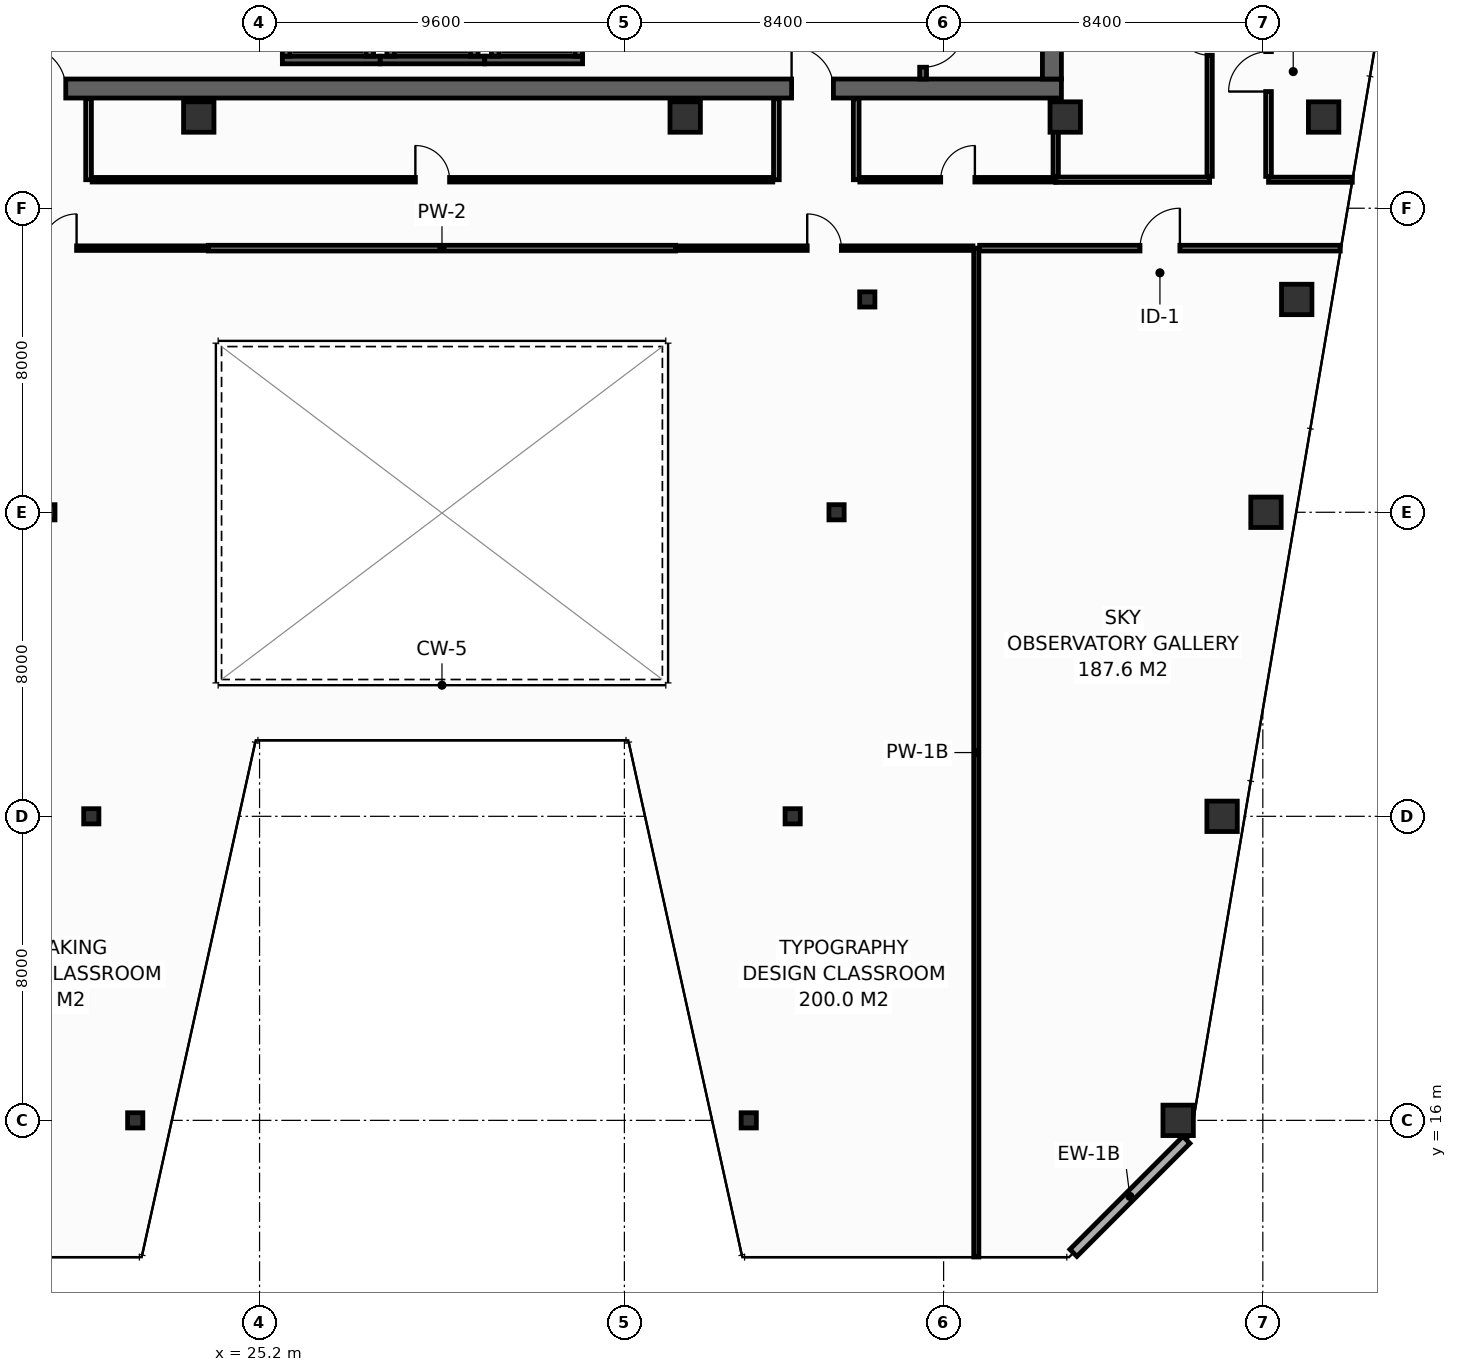
"""IFC4 building model, lengths in metres.
Left out: names, types, materials, properties, quantities, classifications, styles, units other than length and angle.
Written with IfcOpenShell. Run it as: python <this file> out.ifc"""

import sys

from ifc_helpers import new_model, si_unit, direction, frame, frame_2d, origin, origin_2d, place, context, subcontext, project, spatial, rectangle, hollow_rectangle, extrude, element, fill, save


model = new_model("IFC4")
c1 = context("Model", 3, precision=1e-05, world=origin(), true_north=direction((0.0, 1.0)))
c2 = subcontext(c1, "Body", "Model", "MODEL_VIEW")
j1 = project(units=[si_unit("LENGTHUNIT", "METRE"), si_unit("PLANEANGLEUNIT", "RADIAN")], contexts=[c1])
p1 = place(None, origin())
s1 = spatial("IfcSite", under=j1, at=p1, CompositionType="ELEMENT")
p2 = place(p1, origin())
s2 = spatial("IfcBuilding", under=s1, at=p2, CompositionType="ELEMENT")
p3 = place(p2, frame((0.0, 0.0, 220.8)))
s3 = spatial("IfcBuildingStorey", under=s2, at=p3, CompositionType="ELEMENT", Elevation=220.8)
p4 = place(p3, frame((13.6, 43.15, 0.0), z_axis=(0.0, 0.0, 1.0), x_axis=(1.0, 0.0, 0.0)))
e1 = element("IfcWall", 1, at=p4, inside=s3, PredefinedType="SHEAR", context=c2, shape_type="SweptSolid", body=[
    extrude(rectangle(XDim=32.7, YDim=0.5, at=frame_2d((16.35, 0.0))), origin(), (0.0, 0.0, 1.0), 3.35),
])
p5 = place(p4, frame((5.4, 0.0, 0.0)))
e2 = element("IfcOpeningElement", 2, at=p5, cuts=e1, PredefinedType="OPENING", context=c2, shape_type="SweptSolid", body=[
    extrude(rectangle(XDim=1.1, YDim=2.15, at=frame_2d((0.55, 1.075))), frame((0.0, 0.26, 0.0), z_axis=(0.0, -1.0, 0.0), x_axis=(1.0, 0.0, 0.0)), (0.0, 0.0, 1.0), 0.52),
])
p6 = place(p4, frame((25.6, 0.0, 0.0)))
e3 = element("IfcOpeningElement", 3, at=p6, cuts=e1, PredefinedType="OPENING", context=c2, shape_type="SweptSolid", body=[
    extrude(rectangle(XDim=1.1, YDim=2.15, at=frame_2d((0.55, 1.075))), frame((0.0, 0.26, 0.0), z_axis=(0.0, -1.0, 0.0), x_axis=(1.0, 0.0, 0.0)), (0.0, 0.0, 1.0), 0.52),
])
p7 = place(p3, frame((46.05, 43.4, 0.0), z_axis=(0.0, 0.0, 1.0), x_axis=(0.0, 1.0, 0.0)))
e4 = element("IfcWall", 4, at=p7, inside=s3, PredefinedType="SHEAR", context=c2, shape_type="SweptSolid", body=[
    extrude(rectangle(XDim=10.4, YDim=0.5, at=frame_2d((5.2, 0.0))), origin(), (0.0, 0.0, 1.0), 3.35),
])
for number, where, z_axis, x_axis in (
    (5, (23.6, 42.4, 0.0), (0.0, 0.0, 1.0), (1.0, 0.0, 0.0)),
    (6, (36.4, 42.4, 0.0), (0.0, 0.0, 1.0), (1.0, 0.0, 0.0)),
    (7, (46.4, 42.4, 0.0), (0.0, 0.0, 1.0), (1.0, 0.0, 0.0)),
    (8, (53.2, 42.4, 0.0), (0.0, 0.0, 1.0), (1.0, 0.0, 0.0)),
    (9, (49.372, 16.0, 0.0), (0.0, 0.0, 1.0), (1.0, 0.0, 0.0)),
):
    element("IfcColumn", number, at=place(p3, frame(where, z_axis=z_axis, x_axis=x_axis)), inside=s3, PredefinedType="COLUMN", context=c2, shape_type="SweptSolid", body=[
        extrude(hollow_rectangle(XDim=0.8, YDim=0.8, WallThickness=0.036, at=origin_2d()), origin(), (0.0, 0.0, 1.0), 3.8),
    ])
for number, where, z_axis, x_axis in (
    (10, (21.928, 16.0, 0.0), (0.0, 0.0, 1.0), (1.0, 0.0, 0.0)),
    (11, (38.072, 16.0, 0.0), (0.0, 0.0, 1.0), (1.0, 0.0, 0.0)),
):
    element("IfcColumn", number, at=place(p3, frame(where, z_axis=z_axis, x_axis=x_axis)), inside=s3, PredefinedType="COLUMN", context=c2, shape_type="SweptSolid", body=[
        extrude(hollow_rectangle(XDim=0.4, YDim=0.4, WallThickness=0.016, at=origin_2d()), origin(), (0.0, 0.0, 1.0), 3.8),
    ])
p8 = place(p3, frame((50.528, 24.0, 0.0), z_axis=(0.0, 0.0, 1.0), x_axis=(1.0, 0.0, 0.0)))
e12 = element("IfcColumn", 12, at=p8, inside=s3, PredefinedType="COLUMN", context=c2, shape_type="SweptSolid", body=[
    extrude(hollow_rectangle(XDim=0.8, YDim=0.8, WallThickness=0.036, at=origin_2d()), origin(), (0.0, 0.0, 1.0), 3.8),
])
for number, where, z_axis, x_axis in (
    (13, (20.772, 24.0, 0.0), (0.0, 0.0, 1.0), (1.0, 0.0, 0.0)),
    (14, (39.228, 24.0, 0.0), (0.0, 0.0, 1.0), (1.0, 0.0, 0.0)),
):
    element("IfcColumn", number, at=place(p3, frame(where, z_axis=z_axis, x_axis=x_axis)), inside=s3, PredefinedType="COLUMN", context=c2, shape_type="SweptSolid", body=[
        extrude(hollow_rectangle(XDim=0.4, YDim=0.4, WallThickness=0.016, at=origin_2d()), origin(), (0.0, 0.0, 1.0), 3.8),
    ])
p9 = place(p3, frame((51.683, 32.0, 0.0), z_axis=(0.0, 0.0, 1.0), x_axis=(1.0, 0.0, 0.0)))
e15 = element("IfcColumn", 15, at=p9, inside=s3, PredefinedType="COLUMN", context=c2, shape_type="SweptSolid", body=[
    extrude(hollow_rectangle(XDim=0.8, YDim=0.8, WallThickness=0.036, at=origin_2d()), origin(), (0.0, 0.0, 1.0), 3.8),
])
for number, where, z_axis, x_axis in (
    (16, (19.617, 32.0, 0.0), (0.0, 0.0, 1.0), (1.0, 0.0, 0.0)),
    (17, (40.383, 32.0, 0.0), (0.0, 0.0, 1.0), (1.0, 0.0, 0.0)),
):
    element("IfcColumn", number, at=place(p3, frame(where, z_axis=z_axis, x_axis=x_axis)), inside=s3, PredefinedType="COLUMN", context=c2, shape_type="SweptSolid", body=[
        extrude(hollow_rectangle(XDim=0.4, YDim=0.4, WallThickness=0.016, at=origin_2d()), origin(), (0.0, 0.0, 1.0), 3.8),
    ])
p10 = place(p3, frame((52.492, 37.6, 0.0), z_axis=(0.0, 0.0, 1.0), x_axis=(1.0, 0.0, 0.0)))
e18 = element("IfcColumn", 18, at=p10, inside=s3, PredefinedType="COLUMN", context=c2, shape_type="SweptSolid", body=[
    extrude(hollow_rectangle(XDim=0.8, YDim=0.8, WallThickness=0.036, at=origin_2d()), origin(), (0.0, 0.0, 1.0), 3.8),
])
p11 = place(p3, frame((41.192, 37.6, 0.0), z_axis=(0.0, 0.0, 1.0), x_axis=(1.0, 0.0, 0.0)))
e19 = element("IfcColumn", 19, at=p11, inside=s3, PredefinedType="COLUMN", context=c2, shape_type="SweptSolid", body=[
    extrude(hollow_rectangle(XDim=0.4, YDim=0.4, WallThickness=0.016, at=origin_2d()), origin(), (0.0, 0.0, 1.0), 3.8),
])
p12 = place(p3, frame((25.8, 43.9, 0.0), z_axis=(0.0, 0.0, 1.0), x_axis=(1.0, 0.0, 0.0)))
e20 = element("IfcWall", 20, at=p12, inside=s3, PredefinedType="SHEAR", context=c2, shape_type="SweptSolid", body=[
    extrude(rectangle(XDim=2.575, YDim=0.2, at=frame_2d((1.288, 0.0))), origin(), (0.0, 0.0, 1.0), 3.13),
])
for number, where, z_axis, x_axis in (
    (21, (25.9, 44.0, 0.0), (0.0, 0.0, 1.0), (0.0, 1.0, 0.0)),
    (22, (28.1, 44.0, 0.0), (0.0, 0.0, 1.0), (0.0, 1.0, 0.0)),
):
    element("IfcWall", number, at=place(p3, frame(where, z_axis=z_axis, x_axis=x_axis)), inside=s3, PredefinedType="SHEAR", context=c2, shape_type="SweptSolid", body=[
        extrude(rectangle(XDim=2.3, YDim=0.2, at=frame_2d((1.15, 0.0))), origin(), (0.0, 0.0, 1.0), 3.13),
    ])
p13 = place(p3, frame((28.375, 43.9, 0.0), z_axis=(0.0, 0.0, 1.0), x_axis=(1.0, 0.0, 0.0)))
e23 = element("IfcWall", 23, at=p13, inside=s3, PredefinedType="SHEAR", context=c2, shape_type="SweptSolid", body=[
    extrude(rectangle(XDim=2.75, YDim=0.2, at=frame_2d((1.375, 0.0))), origin(), (0.0, 0.0, 1.0), 3.13),
])
for number, where, z_axis, x_axis in (
    (24, (28.65, 44.0, 0.0), (0.0, 0.0, 1.0), (0.0, 1.0, 0.0)),
    (25, (30.85, 44.0, 0.0), (0.0, 0.0, 1.0), (0.0, 1.0, 0.0)),
):
    element("IfcWall", number, at=place(p3, frame(where, z_axis=z_axis, x_axis=x_axis)), inside=s3, PredefinedType="SHEAR", context=c2, shape_type="SweptSolid", body=[
        extrude(rectangle(XDim=2.3, YDim=0.2, at=frame_2d((1.15, 0.0))), origin(), (0.0, 0.0, 1.0), 3.13),
    ])
p14 = place(p3, frame((31.125, 43.9, 0.0), z_axis=(0.0, 0.0, 1.0), x_axis=(1.0, 0.0, 0.0)))
e26 = element("IfcWall", 26, at=p14, inside=s3, PredefinedType="SHEAR", context=c2, shape_type="SweptSolid", body=[
    extrude(rectangle(XDim=2.575, YDim=0.2, at=frame_2d((1.288, 0.0))), origin(), (0.0, 0.0, 1.0), 3.13),
])
for number, where, z_axis, x_axis in (
    (27, (31.4, 44.0, 0.0), (0.0, 0.0, 1.0), (0.0, 1.0, 0.0)),
    (28, (33.6, 44.0, 0.0), (0.0, 0.0, 1.0), (0.0, 1.0, 0.0)),
):
    element("IfcWall", number, at=place(p3, frame(where, z_axis=z_axis, x_axis=x_axis)), inside=s3, PredefinedType="SHEAR", context=c2, shape_type="SweptSolid", body=[
        extrude(rectangle(XDim=2.3, YDim=0.2, at=frame_2d((1.15, 0.0))), origin(), (0.0, 0.0, 1.0), 3.13),
    ])
p15 = place(p3, frame((42.66, 53.8, 0.0), z_axis=(0.0, 0.0, 1.0), x_axis=(0.0, -1.0, 0.0)))
e29 = element("IfcWall", 29, at=p15, inside=s3, PredefinedType="SHEAR", context=c2, shape_type="SweptSolid", body=[
    extrude(rectangle(XDim=10.4, YDim=0.18, at=frame_2d((5.2, 0.0))), origin(), (0.0, 0.0, 1.0), 3.35),
])
p16 = place(p15, frame((8.99, 0.0, 0.0)))
e30 = element("IfcOpeningElement", 30, at=p16, cuts=e29, PredefinedType="OPENING", context=c2, shape_type="SweptSolid", body=[
    extrude(rectangle(XDim=1.1, YDim=2.15, at=frame_2d((0.55, 1.075))), frame((0.0, 0.1, 0.0), z_axis=(0.0, -1.0, 0.0), x_axis=(1.0, 0.0, 0.0)), (0.0, 0.0, 1.0), 0.2),
])
p17 = place(p3, frame((46.615, 12.513, 0.0), z_axis=(0.0, 0.0, 1.0), x_axis=(0.707135806771, 0.70707775441, 0.0)))
e31 = element("IfcWall", 31, at=p17, inside=s3, PredefinedType="STANDARD", context=c2, shape_type="SweptSolid", body=[
    extrude(rectangle(XDim=4.206, YDim=0.26, at=frame_2d((2.103, 0.0))), origin(), (0.0, 0.0, 1.0), 3.35),
])
p18 = place(p3, frame((46.15, 40.75, 0.0), z_axis=(0.0, 0.0, 1.0), x_axis=(1.0, 0.0, 0.0)))
e32 = element("IfcWall", 32, at=p18, inside=s3, PredefinedType="PARTITIONING", context=c2, shape_type="SweptSolid", body=[
    extrude(rectangle(XDim=4.05, YDim=0.14, at=frame_2d((2.025, 0.0))), origin(), (0.0, 0.0, 1.0), 3.35),
])
p19 = place(p3, frame((46.15, 40.84, 0.0), z_axis=(0.0, 0.0, 1.0), x_axis=(0.0, 1.0, 0.0)))
e33 = element("IfcWall", 33, at=p19, inside=s3, PredefinedType="PARTITIONING", context=c2, shape_type="SweptSolid", body=[
    extrude(rectangle(XDim=2.04, YDim=0.14, at=frame_2d((1.02, 0.0))), origin(), (0.0, 0.0, 1.0), 3.35),
])
p20 = place(p3, frame((50.2, 40.84, 0.0), z_axis=(0.0, 0.0, 1.0), x_axis=(0.0, 1.0, 0.0)))
e34 = element("IfcWall", 34, at=p20, inside=s3, PredefinedType="PARTITIONING", context=c2, shape_type="SweptSolid", body=[
    extrude(rectangle(XDim=7.27, YDim=0.14, at=frame_2d((3.635, 0.0))), origin(), (0.0, 0.0, 1.0), 2.635),
])
p21 = place(p20, frame((3.185, 0.0, 0.0)))
e35 = element("IfcOpeningElement", 35, at=p21, cuts=e34, PredefinedType="OPENING", context=c2, shape_type="SweptSolid", body=[
    extrude(rectangle(XDim=0.9, YDim=2.1, at=frame_2d((0.45, 1.05))), frame((0.0, 0.08, 0.0), z_axis=(0.0, -1.0, 0.0), x_axis=(1.0, 0.0, 0.0)), (0.0, 0.0, 1.0), 0.16),
])
p22 = place(p3, frame((51.75, 40.75, 0.0), z_axis=(0.0, 0.0, 1.0), x_axis=(1.0, 0.0, 0.0)))
e36 = element("IfcWall", 36, at=p22, inside=s3, PredefinedType="PARTITIONING", context=c2, shape_type="SweptSolid", body=[
    extrude(rectangle(XDim=2.205, YDim=0.135, at=frame_2d((1.103, 0.0))), origin(), (0.0, 0.0, 1.0), 2.835),
])
p23 = place(p3, frame((51.75, 40.837, 0.0), z_axis=(0.0, 0.0, 1.0), x_axis=(0.0, 1.0, 0.0)))
e37 = element("IfcWall", 37, at=p23, inside=s3, PredefinedType="PARTITIONING", context=c2, shape_type="SweptSolid", body=[
    extrude(rectangle(XDim=5.075, YDim=0.15, at=frame_2d((2.538, 0.0))), origin(), (0.0, 0.0, 1.0), 2.635),
])
p24 = place(p23, frame((2.233, 0.0, 0.0)))
e38 = element("IfcOpeningElement", 38, at=p24, cuts=e37, PredefinedType="OPENING", context=c2, shape_type="SweptSolid", body=[
    extrude(rectangle(XDim=1.05, YDim=2.15, at=frame_2d((0.525, 1.075))), frame((0.0, 0.085, 0.0), z_axis=(0.0, -1.0, 0.0), x_axis=(1.0, 0.0, 0.0)), (0.0, 0.0, 1.0), 0.17),
])
for number, where, z_axis, x_axis in (
    (39, (20.7, 40.75, 0.0), (0.0, 0.0, 1.0), (0.0, 1.0, 0.0)),
    (40, (38.8, 40.75, 0.0), (0.0, 0.0, 1.0), (0.0, 1.0, 0.0)),
    (41, (40.9, 40.75, 0.0), (0.0, 0.0, 1.0), (0.0, 1.0, 0.0)),
):
    element("IfcWall", number, at=place(p3, frame(where, z_axis=z_axis, x_axis=x_axis)), inside=s3, PredefinedType="PARTITIONING", context=c2, shape_type="SweptSolid", body=[
        extrude(rectangle(XDim=2.13, YDim=0.15, at=frame_2d((1.065, 0.0))), origin(), (0.0, 0.0, 1.0), 3.35),
    ])
p25 = place(p3, frame((20.795, 40.75, 0.0), z_axis=(0.0, 0.0, 1.0), x_axis=(1.0, 0.0, 0.0)))
e42 = element("IfcWall", 42, at=p25, inside=s3, PredefinedType="PARTITIONING", context=c2, shape_type="SweptSolid", body=[
    extrude(rectangle(XDim=17.91, YDim=0.12, at=frame_2d((8.955, 0.0))), origin(), (0.0, 0.0, 1.0), 2.635),
])
p26 = place(p25, frame((8.505, 0.0, 0.0)))
e43 = element("IfcOpeningElement", 43, at=p26, cuts=e42, PredefinedType="OPENING", context=c2, shape_type="SweptSolid", body=[
    extrude(rectangle(XDim=0.9, YDim=2.1, at=frame_2d((0.45, 1.05))), frame((0.0, 0.07, 0.0), z_axis=(0.0, -1.0, 0.0), x_axis=(1.0, 0.0, 0.0)), (0.0, 0.0, 1.0), 0.14),
])
p27 = place(p3, frame((40.995, 40.75, 0.0), z_axis=(0.0, 0.0, 1.0), x_axis=(1.0, 0.0, 0.0)))
e44 = element("IfcWall", 44, at=p27, inside=s3, PredefinedType="PARTITIONING", context=c2, shape_type="SweptSolid", body=[
    extrude(rectangle(XDim=5.155, YDim=0.12, at=frame_2d((2.577, 0.0))), origin(), (0.0, 0.0, 1.0), 3.35),
])
p28 = place(p27, frame((2.128, 0.0, 0.0)))
e45 = element("IfcOpeningElement", 45, at=p28, cuts=e44, PredefinedType="OPENING", context=c2, shape_type="SweptSolid", body=[
    extrude(rectangle(XDim=0.9, YDim=2.1, at=frame_2d((0.45, 1.05))), frame((0.0, 0.07, 0.0), z_axis=(0.0, -1.0, 0.0), x_axis=(1.0, 0.0, 0.0)), (0.0, 0.0, 1.0), 0.14),
])
p29 = place(p3, frame((44.06, 12.405, 0.0), z_axis=(0.0, 0.0, 1.0), x_axis=(0.0, 1.0, 0.0)))
e46 = element("IfcWall", 46, at=p29, inside=s3, PredefinedType="PARTITIONING", context=c2, shape_type="SweptSolid", body=[
    extrude(rectangle(XDim=26.545, YDim=0.135, at=frame_2d((13.272, 0.0))), origin(), (0.0, 0.0, 1.0), 2.635),
])
p30 = place(p3, frame((16.02, 38.95, 0.0), z_axis=(0.0, 0.0, 1.0), x_axis=(1.0, 0.0, 0.0)))
e47 = element("IfcWall", 47, at=p30, inside=s3, PredefinedType="PARTITIONING", context=c2, shape_type="SweptSolid", body=[
    extrude(rectangle(XDim=7.83, YDim=0.12, at=frame_2d((3.915, 0.0))), origin(), (0.0, 0.0, 1.0), 2.635),
])
p31 = place(p30, frame((3.465, 0.0, 0.0)))
e48 = element("IfcOpeningElement", 48, at=p31, cuts=e47, PredefinedType="OPENING", context=c2, shape_type="SweptSolid", body=[
    extrude(rectangle(XDim=0.9, YDim=2.1, at=frame_2d((0.45, 1.05))), frame((0.0, 0.07, 0.0), z_axis=(0.0, -1.0, 0.0), x_axis=(1.0, 0.0, 0.0)), (0.0, 0.0, 1.0), 0.14),
])
p32 = place(p3, frame((23.85, 38.95, 0.0), z_axis=(0.0, 0.0, 1.0), x_axis=(1.0, 0.0, 0.0)))
e49 = element("IfcWall", 49, at=p32, inside=s3, PredefinedType="PARTITIONING", context=c2, shape_type="SweptSolid", body=[
    extrude(rectangle(XDim=12.3, YDim=0.15, at=frame_2d((6.15, 0.0))), origin(), (0.0, 0.0, 1.0), 3.35),
])
p33 = place(p3, frame((36.15, 38.95, 0.0), z_axis=(0.0, 0.0, 1.0), x_axis=(1.0, 0.0, 0.0)))
e50 = element("IfcWall", 50, at=p33, inside=s3, PredefinedType="PARTITIONING", context=c2, shape_type="SweptSolid", body=[
    extrude(rectangle(XDim=7.823, YDim=0.12, at=frame_2d((3.911, 0.0))), origin(), (0.0, 0.0, 1.0), 2.635),
])
p34 = place(p33, frame((3.461, 0.0, 0.0)))
e51 = element("IfcOpeningElement", 51, at=p34, cuts=e50, PredefinedType="OPENING", context=c2, shape_type="SweptSolid", body=[
    extrude(rectangle(XDim=0.9, YDim=2.1, at=frame_2d((0.45, 1.05))), frame((0.0, 0.07, 0.0), z_axis=(0.0, -1.0, 0.0), x_axis=(1.0, 0.0, 0.0)), (0.0, 0.0, 1.0), 0.14),
])
p35 = place(p3, frame((44.147, 38.95, 0.0), z_axis=(0.0, 0.0, 1.0), x_axis=(1.0, 0.0, 0.0)))
e52 = element("IfcWall", 52, at=p35, inside=s3, PredefinedType="PARTITIONING", context=c2, shape_type="SweptSolid", body=[
    extrude(rectangle(XDim=9.49, YDim=0.15, at=frame_2d((4.745, 0.0))), origin(), (0.0, 0.0, 1.0), 2.835),
])
p36 = place(p35, frame((4.22, 0.0, 0.0)))
e53 = element("IfcOpeningElement", 53, at=p36, cuts=e52, PredefinedType="OPENING", context=c2, shape_type="SweptSolid", body=[
    extrude(rectangle(XDim=1.05, YDim=2.15, at=frame_2d((0.525, 1.075))), frame((0.0, 0.085, 0.0), z_axis=(0.0, -1.0, 0.0), x_axis=(1.0, 0.0, 0.0)), (0.0, 0.0, 1.0), 0.17),
])
p37 = place(p16, origin())
e54 = element("IfcDoor", 54, at=p37, inside=s3, OperationType="SINGLE_SWING_LEFT", PredefinedType="DOOR", context=c2, shape_type="SweptSolid", body=[
    extrude(rectangle(XDim=1.1, YDim=2.15, at=frame_2d((0.55, 1.075))), frame((0.0, 0.025, 0.0), z_axis=(0.0, -1.0, 0.0), x_axis=(1.0, 0.0, 0.0)), (0.0, 0.0, 1.0), 0.05),
])
fill(e30, e54)
p38 = place(p5, origin())
e55 = element("IfcDoor", 55, at=p38, inside=s3, OperationType="SINGLE_SWING_LEFT", PredefinedType="DOOR", context=c2, shape_type="SweptSolid", body=[
    extrude(rectangle(XDim=1.1, YDim=2.15, at=frame_2d((0.55, 1.075))), frame((0.0, 0.025, 0.0), z_axis=(0.0, -1.0, 0.0), x_axis=(1.0, 0.0, 0.0)), (0.0, 0.0, 1.0), 0.05),
])
fill(e2, e55)
p39 = place(p6, origin())
e56 = element("IfcDoor", 56, at=p39, inside=s3, OperationType="SINGLE_SWING_LEFT", PredefinedType="DOOR", context=c2, shape_type="SweptSolid", body=[
    extrude(rectangle(XDim=1.1, YDim=2.15, at=frame_2d((0.55, 1.075))), frame((0.0, 0.025, 0.0), z_axis=(0.0, -1.0, 0.0), x_axis=(1.0, 0.0, 0.0)), (0.0, 0.0, 1.0), 0.05),
])
fill(e3, e56)
p40 = place(p21, origin())
e57 = element("IfcDoor", 57, at=p40, inside=s3, OperationType="SINGLE_SWING_RIGHT", PredefinedType="DOOR", context=c2, shape_type="SweptSolid", body=[
    extrude(rectangle(XDim=0.9, YDim=2.1, at=frame_2d((0.45, 1.05))), frame((0.0, 0.025, 0.0), z_axis=(0.0, -1.0, 0.0), x_axis=(1.0, 0.0, 0.0)), (0.0, 0.0, 1.0), 0.05),
])
fill(e35, e57)
p41 = place(p24, origin())
e58 = element("IfcDoor", 58, at=p41, inside=s3, OperationType="SINGLE_SWING_LEFT", PredefinedType="DOOR", context=c2, shape_type="SweptSolid", body=[
    extrude(rectangle(XDim=1.05, YDim=2.15, at=frame_2d((0.525, 1.075))), frame((0.0, 0.025, 0.0), z_axis=(0.0, -1.0, 0.0), x_axis=(1.0, 0.0, 0.0)), (0.0, 0.0, 1.0), 0.05),
])
fill(e38, e58)
p42 = place(p26, origin())
e59 = element("IfcDoor", 59, at=p42, inside=s3, OperationType="SINGLE_SWING_LEFT", PredefinedType="DOOR", context=c2, shape_type="SweptSolid", body=[
    extrude(rectangle(XDim=0.9, YDim=2.1, at=frame_2d((0.45, 1.05))), frame((0.0, 0.025, 0.0), z_axis=(0.0, -1.0, 0.0), x_axis=(1.0, 0.0, 0.0)), (0.0, 0.0, 1.0), 0.05),
])
fill(e43, e59)
p43 = place(p28, origin())
e60 = element("IfcDoor", 60, at=p43, inside=s3, OperationType="SINGLE_SWING_RIGHT", PredefinedType="DOOR", context=c2, shape_type="SweptSolid", body=[
    extrude(rectangle(XDim=0.9, YDim=2.1, at=frame_2d((0.45, 1.05))), frame((0.0, 0.025, 0.0), z_axis=(0.0, -1.0, 0.0), x_axis=(1.0, 0.0, 0.0)), (0.0, 0.0, 1.0), 0.05),
])
fill(e45, e60)
p44 = place(p31, origin())
e61 = element("IfcDoor", 61, at=p44, inside=s3, OperationType="SINGLE_SWING_RIGHT", PredefinedType="DOOR", context=c2, shape_type="SweptSolid", body=[
    extrude(rectangle(XDim=0.9, YDim=2.1, at=frame_2d((0.45, 1.05))), frame((0.0, 0.025, 0.0), z_axis=(0.0, -1.0, 0.0), x_axis=(1.0, 0.0, 0.0)), (0.0, 0.0, 1.0), 0.05),
])
fill(e48, e61)
p45 = place(p34, origin())
e62 = element("IfcDoor", 62, at=p45, inside=s3, OperationType="SINGLE_SWING_LEFT", PredefinedType="DOOR", context=c2, shape_type="SweptSolid", body=[
    extrude(rectangle(XDim=0.9, YDim=2.1, at=frame_2d((0.45, 1.05))), frame((0.0, 0.025, 0.0), z_axis=(0.0, -1.0, 0.0), x_axis=(1.0, 0.0, 0.0)), (0.0, 0.0, 1.0), 0.05),
])
fill(e51, e62)
p46 = place(p36, origin())
e63 = element("IfcDoor", 63, at=p46, inside=s3, OperationType="SINGLE_SWING_RIGHT", PredefinedType="DOOR", context=c2, shape_type="SweptSolid", body=[
    extrude(rectangle(XDim=1.05, YDim=2.15, at=frame_2d((0.525, 1.075))), frame((0.0, 0.025, 0.0), z_axis=(0.0, -1.0, 0.0), x_axis=(1.0, 0.0, 0.0)), (0.0, 0.0, 1.0), 0.05),
])
fill(e53, e63)
save(model, sys.argv[1])
